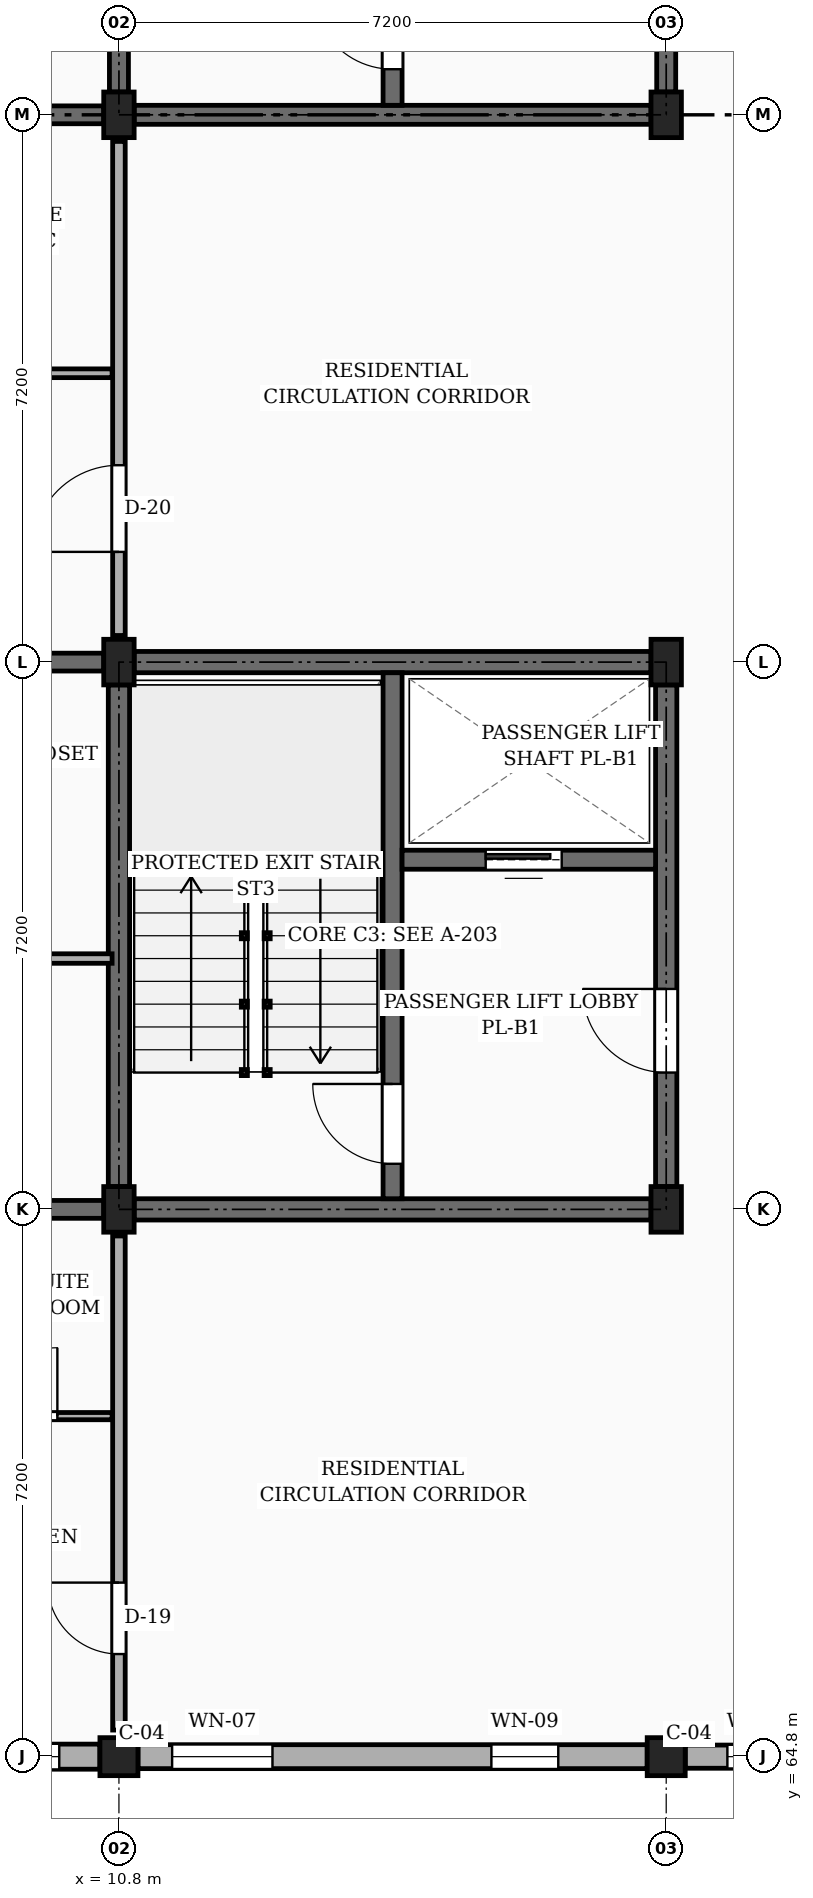
"""IFC4 building model, lengths in metres.
Left out: names, types, materials, properties, quantities, classifications, styles, units other than length and angle.
Written with IfcOpenShell. Run it as: python <this file> out.ifc"""

import sys

from ifc_helpers import new_model, si_unit, direction, frame, frame_2d, origin, origin_2d, place, context, subcontext, project, spatial, rectangle, extrude, element, fill, save


model = new_model("IFC4")
c1 = context("Model", 3, precision=1e-05, world=origin(), true_north=direction((0.0, 1.0)))
c2 = subcontext(c1, "Body", "Model", "MODEL_VIEW")
j1 = project(units=[si_unit("LENGTHUNIT", "METRE"), si_unit("PLANEANGLEUNIT", "RADIAN")], contexts=[c1])
p1 = place(None, origin())
s1 = spatial("IfcSite", under=j1, at=p1, CompositionType="ELEMENT")
p2 = place(p1, origin())
s2 = spatial("IfcBuilding", under=s1, at=p2, CompositionType="ELEMENT")
p3 = place(p2, frame((0.0, 0.0, 23.4)))
s3 = spatial("IfcBuildingStorey", under=s2, at=p3, CompositionType="ELEMENT", Elevation=23.4)
p4 = place(p3, frame((10.8, 64.8, 0.0), z_axis=(0.0, 0.0, 1.0), x_axis=(1.0, 0.0, 0.0)))
e1 = element("IfcColumn", 1, at=p4, inside=s3, PredefinedType="COLUMN", context=c2, shape_type="SweptSolid", body=[
    extrude(rectangle(XDim=0.5, YDim=0.5, at=origin_2d()), origin(), (0.0, 0.0, 1.0), 3.15),
])
for number, where, z_axis, x_axis in (
    (2, (10.8, 72.0, 0.0), (0.0, 0.0, 1.0), (1.0, 0.0, 0.0)),
    (3, (10.8, 79.2, 0.0), (0.0, 0.0, 1.0), (1.0, 0.0, 0.0)),
    (4, (10.8, 86.4, 0.0), (0.0, 0.0, 1.0), (1.0, 0.0, 0.0)),
):
    element("IfcColumn", number, at=place(p3, frame(where, z_axis=z_axis, x_axis=x_axis)), inside=s3, PredefinedType="COLUMN", context=c2, shape_type="SweptSolid", body=[
        extrude(rectangle(XDim=0.4, YDim=0.6, at=origin_2d()), origin(), (0.0, 0.0, 1.0), 3.15),
    ])
p5 = place(p3, frame((18.0, 64.8, 0.0), z_axis=(0.0, 0.0, 1.0), x_axis=(1.0, 0.0, 0.0)))
e5 = element("IfcColumn", 5, at=p5, inside=s3, PredefinedType="COLUMN", context=c2, shape_type="SweptSolid", body=[
    extrude(rectangle(XDim=0.5, YDim=0.5, at=origin_2d()), origin(), (0.0, 0.0, 1.0), 3.15),
])
for number, where, z_axis, x_axis in (
    (6, (18.0, 72.0, 0.0), (0.0, 0.0, 1.0), (1.0, 0.0, 0.0)),
    (7, (18.0, 79.2, 0.0), (0.0, 0.0, 1.0), (1.0, 0.0, 0.0)),
    (8, (18.0, 86.4, 0.0), (0.0, 0.0, 1.0), (1.0, 0.0, 0.0)),
):
    element("IfcColumn", number, at=place(p3, frame(where, z_axis=z_axis, x_axis=x_axis)), inside=s3, PredefinedType="COLUMN", context=c2, shape_type="SweptSolid", body=[
        extrude(rectangle(XDim=0.4, YDim=0.6, at=origin_2d()), origin(), (0.0, 0.0, 1.0), 3.15),
    ])
p6 = place(p3, frame((3.85, 72.0, 0.0), z_axis=(0.0, 0.0, 1.0), x_axis=(1.0, 0.0, 0.0)))
e9 = element("IfcWall", 9, at=p6, inside=s3, PredefinedType="SOLIDWALL", context=c2, shape_type="SweptSolid", body=[
    extrude(rectangle(XDim=6.75, YDim=0.235, at=frame_2d((3.375, 0.0))), origin(), (0.0, 0.0, 1.0), 2.21),
])
p7 = place(p6, frame((1.35, 0.0, 0.0)))
e10 = element("IfcOpeningElement", 10, at=p7, cuts=e9, PredefinedType="OPENING", context=c2, shape_type="SweptSolid", body=[
    extrude(rectangle(XDim=0.98, YDim=2.12, at=frame_2d((0.49, 1.06))), frame((0.0, 0.127, 0.0), z_axis=(0.0, -1.0, 0.0), x_axis=(1.0, 0.0, 0.0)), (0.0, 0.0, 1.0), 0.255),
])
p8 = place(p3, frame((3.85, 79.2, 0.0), z_axis=(0.0, 0.0, 1.0), x_axis=(1.0, 0.0, 0.0)))
e11 = element("IfcWall", 11, at=p8, inside=s3, PredefinedType="SOLIDWALL", context=c2, shape_type="SweptSolid", body=[
    extrude(rectangle(XDim=6.75, YDim=0.235, at=frame_2d((3.375, 0.0))), origin(), (0.0, 0.0, 1.0), 2.21),
])
p9 = place(p3, frame((3.85, 86.4, 0.0), z_axis=(0.0, 0.0, 1.0), x_axis=(1.0, 0.0, 0.0)))
e12 = element("IfcWall", 12, at=p9, inside=s3, PredefinedType="SOLIDWALL", context=c2, shape_type="SweptSolid", body=[
    extrude(rectangle(XDim=6.75, YDim=0.235, at=frame_2d((3.375, 0.0))), origin(), (0.0, 0.0, 1.0), 2.21),
])
p10 = place(p9, frame((1.35, 0.0, 0.0)))
e13 = element("IfcOpeningElement", 13, at=p10, cuts=e12, PredefinedType="OPENING", context=c2, shape_type="SweptSolid", body=[
    extrude(rectangle(XDim=0.98, YDim=2.12, at=frame_2d((0.49, 1.06))), frame((0.0, 0.127, 0.0), z_axis=(0.0, -1.0, 0.0), x_axis=(1.0, 0.0, 0.0)), (0.0, 0.0, 1.0), 0.255),
])
p11 = place(p3, frame((3.85, 64.8, 0.0), z_axis=(0.0, 0.0, 1.0), x_axis=(1.0, 0.0, 0.0)))
e14 = element("IfcWall", 14, at=p11, inside=s3, PredefinedType="SOLIDWALL", context=c2, shape_type="SweptSolid", body=[
    extrude(rectangle(XDim=6.7, YDim=0.33, at=frame_2d((3.35, 0.0))), origin(), (0.0, 0.0, 1.0), 2.48),
])
p12 = place(p11, frame((1.715, 0.0, 0.78)))
e15 = element("IfcOpeningElement", 15, at=p12, cuts=e14, PredefinedType="OPENING", context=c2, shape_type="SweptSolid", body=[
    extrude(rectangle(XDim=1.16, YDim=1.15, at=frame_2d((0.58, 0.575))), frame((0.0, 0.175, 0.0), z_axis=(0.0, -1.0, 0.0), x_axis=(1.0, 0.0, 0.0)), (0.0, 0.0, 1.0), 0.35),
])
p13 = place(p11, frame((4.845, 0.0, 0.78)))
e16 = element("IfcOpeningElement", 16, at=p13, cuts=e14, PredefinedType="OPENING", context=c2, shape_type="SweptSolid", body=[
    extrude(rectangle(XDim=1.32, YDim=1.15, at=frame_2d((0.66, 0.575))), frame((0.0, 0.175, 0.0), z_axis=(0.0, -1.0, 0.0), x_axis=(1.0, 0.0, 0.0)), (0.0, 0.0, 1.0), 0.35),
])
p14 = place(p3, frame((11.05, 64.8, 0.0), z_axis=(0.0, 0.0, 1.0), x_axis=(1.0, 0.0, 0.0)))
e17 = element("IfcWall", 17, at=p14, inside=s3, PredefinedType="SOLIDWALL", context=c2, shape_type="SweptSolid", body=[
    extrude(rectangle(XDim=6.7, YDim=0.315, at=frame_2d((3.35, 0.0))), origin(), (0.0, 0.0, 1.0), 2.48),
])
p15 = place(p14, frame((0.45, 0.0, 0.78)))
e18 = element("IfcOpeningElement", 18, at=p15, cuts=e17, PredefinedType="OPENING", context=c2, shape_type="SweptSolid", body=[
    extrude(rectangle(XDim=1.32, YDim=1.15, at=frame_2d((0.66, 0.575))), frame((0.0, 0.167, 0.0), z_axis=(0.0, -1.0, 0.0), x_axis=(1.0, 0.0, 0.0)), (0.0, 0.0, 1.0), 0.335),
])
p16 = place(p14, frame((4.65, 0.0, 0.78)))
e19 = element("IfcOpeningElement", 19, at=p16, cuts=e17, PredefinedType="OPENING", context=c2, shape_type="SweptSolid", body=[
    extrude(rectangle(XDim=0.88, YDim=1.26, at=frame_2d((0.44, 0.63))), frame((0.0, 0.167, 0.0), z_axis=(0.0, -1.0, 0.0), x_axis=(1.0, 0.0, 0.0)), (0.0, 0.0, 1.0), 0.335),
])
p17 = place(p3, frame((18.25, 64.8, 0.0), z_axis=(0.0, 0.0, 1.0), x_axis=(1.0, 0.0, 0.0)))
e20 = element("IfcWall", 20, at=p17, inside=s3, PredefinedType="SOLIDWALL", context=c2, shape_type="SweptSolid", body=[
    extrude(rectangle(XDim=6.7, YDim=0.305, at=frame_2d((3.35, 0.0))), origin(), (0.0, 0.0, 1.0), 2.48),
])
p18 = place(p17, frame((0.555, 0.0, 0.78)))
e21 = element("IfcOpeningElement", 21, at=p18, cuts=e20, PredefinedType="OPENING", context=c2, shape_type="SweptSolid", body=[
    extrude(rectangle(XDim=0.88, YDim=1.26, at=frame_2d((0.44, 0.63))), frame((0.0, 0.163, 0.0), z_axis=(0.0, -1.0, 0.0), x_axis=(1.0, 0.0, 0.0)), (0.0, 0.0, 1.0), 0.325),
])
p19 = place(p17, frame((2.28, 0.0, 0.78)))
e22 = element("IfcOpeningElement", 22, at=p19, cuts=e20, PredefinedType="OPENING", context=c2, shape_type="SweptSolid", body=[
    extrude(rectangle(XDim=1.04, YDim=1.26, at=frame_2d((0.52, 0.63))), frame((0.0, 0.163, 0.0), z_axis=(0.0, -1.0, 0.0), x_axis=(1.0, 0.0, 0.0)), (0.0, 0.0, 1.0), 0.325),
])
p20 = place(p17, frame((4.555, 0.0, 0.78)))
e23 = element("IfcOpeningElement", 23, at=p20, cuts=e20, PredefinedType="OPENING", context=c2, shape_type="SweptSolid", body=[
    extrude(rectangle(XDim=1.2, YDim=1.26, at=frame_2d((0.6, 0.63))), frame((0.0, 0.163, 0.0), z_axis=(0.0, -1.0, 0.0), x_axis=(1.0, 0.0, 0.0)), (0.0, 0.0, 1.0), 0.325),
])
p21 = place(p3, frame((10.8, 72.3, 0.0), z_axis=(0.0, 0.0, 1.0), x_axis=(0.0, 1.0, 0.0)))
e24 = element("IfcWall", 24, at=p21, inside=s3, PredefinedType="SHEAR", context=c2, shape_type="SweptSolid", body=[
    extrude(rectangle(XDim=6.6, YDim=0.28, at=frame_2d((3.3, 0.0))), origin(), (0.0, 0.0, 1.0), 2.91),
])
p22 = place(p3, frame((11.0, 79.2, 0.0), z_axis=(0.0, 0.0, 1.0), x_axis=(1.0, 0.0, 0.0)))
e25 = element("IfcWall", 25, at=p22, inside=s3, PredefinedType="SHEAR", context=c2, shape_type="SweptSolid", body=[
    extrude(rectangle(XDim=6.8, YDim=0.28, at=frame_2d((3.4, 0.0))), origin(), (0.0, 0.0, 1.0), 2.91),
])
p23 = place(p3, frame((18.0, 72.3, 0.0), z_axis=(0.0, 0.0, 1.0), x_axis=(0.0, 1.0, 0.0)))
e26 = element("IfcWall", 26, at=p23, inside=s3, PredefinedType="SHEAR", context=c2, shape_type="SweptSolid", body=[
    extrude(rectangle(XDim=6.6, YDim=0.28, at=frame_2d((3.3, 0.0))), origin(), (0.0, 0.0, 1.0), 2.91),
])
p24 = place(p23, frame((1.5, 0.0, 0.0)))
e27 = element("IfcOpeningElement", 27, at=p24, cuts=e26, PredefinedType="OPENING", context=c2, shape_type="SweptSolid", body=[
    extrude(rectangle(XDim=1.1, YDim=2.15, at=frame_2d((0.55, 1.075))), frame((0.0, 0.15, 0.0), z_axis=(0.0, -1.0, 0.0), x_axis=(1.0, 0.0, 0.0)), (0.0, 0.0, 1.0), 0.3),
])
p25 = place(p3, frame((11.0, 72.0, 0.0), z_axis=(0.0, 0.0, 1.0), x_axis=(1.0, 0.0, 0.0)))
e28 = element("IfcWall", 28, at=p25, inside=s3, PredefinedType="SHEAR", context=c2, shape_type="SweptSolid", body=[
    extrude(rectangle(XDim=6.8, YDim=0.28, at=frame_2d((3.4, 0.0))), origin(), (0.0, 0.0, 1.0), 2.91),
])
p26 = place(p3, frame((14.4, 72.14, 0.0), z_axis=(0.0, 0.0, 1.0), x_axis=(0.0, 1.0, 0.0)))
e29 = element("IfcWall", 29, at=p26, inside=s3, PredefinedType="SHEAR", context=c2, shape_type="SweptSolid", body=[
    extrude(rectangle(XDim=6.92, YDim=0.25, at=frame_2d((3.46, 0.0))), origin(), (0.0, 0.0, 1.0), 2.91),
])
p27 = place(p26, frame((0.46, 0.0, 0.0)))
e30 = element("IfcOpeningElement", 30, at=p27, cuts=e29, PredefinedType="OPENING", context=c2, shape_type="SweptSolid", body=[
    extrude(rectangle(XDim=1.05, YDim=2.15, at=frame_2d((0.525, 1.075))), frame((0.0, 0.135, 0.0), z_axis=(0.0, -1.0, 0.0), x_axis=(1.0, 0.0, 0.0)), (0.0, 0.0, 1.0), 0.27),
])
p28 = place(p3, frame((14.525, 76.6, 0.0), z_axis=(0.0, 0.0, 1.0), x_axis=(1.0, 0.0, 0.0)))
e31 = element("IfcWall", 31, at=p28, inside=s3, PredefinedType="SHEAR", context=c2, shape_type="SweptSolid", body=[
    extrude(rectangle(XDim=3.335, YDim=0.25, at=frame_2d((1.667, 0.0))), origin(), (0.0, 0.0, 1.0), 2.91),
])
p29 = place(p28, frame((1.1, 0.0, 0.0)))
e32 = element("IfcOpeningElement", 32, at=p29, cuts=e31, PredefinedType="OPENING", context=c2, shape_type="SweptSolid", body=[
    extrude(rectangle(XDim=1.0, YDim=2.2, at=frame_2d((0.5, 1.1))), frame((0.0, 0.135, 0.0), z_axis=(0.0, -1.0, 0.0), x_axis=(1.0, 0.0, 0.0)), (0.0, 0.0, 1.0), 0.27),
])
p30 = place(p3, frame((10.8, 86.7, 0.0), z_axis=(0.0, 0.0, 1.0), x_axis=(0.0, 1.0, 0.0)))
e33 = element("IfcWall", 33, at=p30, inside=s3, PredefinedType="SHEAR", context=c2, shape_type="SweptSolid", body=[
    extrude(rectangle(XDim=6.65, YDim=0.25, at=frame_2d((3.325, 0.0))), origin(), (0.0, 0.0, 1.0), 2.91),
])
p31 = place(p3, frame((18.0, 86.7, 0.0), z_axis=(0.0, 0.0, 1.0), x_axis=(0.0, 1.0, 0.0)))
e34 = element("IfcWall", 34, at=p31, inside=s3, PredefinedType="SHEAR", context=c2, shape_type="SweptSolid", body=[
    extrude(rectangle(XDim=6.65, YDim=0.25, at=frame_2d((3.325, 0.0))), origin(), (0.0, 0.0, 1.0), 2.91),
])
p32 = place(p31, frame((1.5, 0.0, 0.0)))
e35 = element("IfcOpeningElement", 35, at=p32, cuts=e34, PredefinedType="OPENING", context=c2, shape_type="SweptSolid", body=[
    extrude(rectangle(XDim=1.1, YDim=2.15, at=frame_2d((0.55, 1.075))), frame((0.0, 0.135, 0.0), z_axis=(0.0, -1.0, 0.0), x_axis=(1.0, 0.0, 0.0)), (0.0, 0.0, 1.0), 0.27),
])
p33 = place(p3, frame((11.0, 86.4, 0.0), z_axis=(0.0, 0.0, 1.0), x_axis=(1.0, 0.0, 0.0)))
e36 = element("IfcWall", 36, at=p33, inside=s3, PredefinedType="SHEAR", context=c2, shape_type="SweptSolid", body=[
    extrude(rectangle(XDim=6.8, YDim=0.25, at=frame_2d((3.4, 0.0))), origin(), (0.0, 0.0, 1.0), 2.91),
])
p34 = place(p3, frame((14.4, 86.525, 0.0), z_axis=(0.0, 0.0, 1.0), x_axis=(0.0, 1.0, 0.0)))
e37 = element("IfcWall", 37, at=p34, inside=s3, PredefinedType="SHEAR", context=c2, shape_type="SweptSolid", body=[
    extrude(rectangle(XDim=6.915, YDim=0.25, at=frame_2d((3.458, 0.0))), origin(), (0.0, 0.0, 1.0), 2.91),
])
p35 = place(p34, frame((0.475, 0.0, 0.0)))
e38 = element("IfcOpeningElement", 38, at=p35, cuts=e37, PredefinedType="OPENING", context=c2, shape_type="SweptSolid", body=[
    extrude(rectangle(XDim=1.05, YDim=2.15, at=frame_2d((0.525, 1.075))), frame((0.0, 0.135, 0.0), z_axis=(0.0, -1.0, 0.0), x_axis=(1.0, 0.0, 0.0)), (0.0, 0.0, 1.0), 0.27),
])
p36 = place(p3, frame((10.8, 65.15, 0.0), z_axis=(0.0, 0.0, 1.0), x_axis=(0.0, 1.0, 0.0)))
e39 = element("IfcWall", 39, at=p36, inside=s3, PredefinedType="PARTITIONING", context=c2, shape_type="SweptSolid", body=[
    extrude(rectangle(XDim=6.5, YDim=0.165, at=frame_2d((3.25, 0.0))), origin(), (0.0, 0.0, 1.0), 2.345),
])
p37 = place(p36, frame((1.0, 0.0, 0.0)))
e40 = element("IfcOpeningElement", 40, at=p37, cuts=e39, PredefinedType="OPENING", context=c2, shape_type="SweptSolid", body=[
    extrude(rectangle(XDim=0.94, YDim=2.12, at=frame_2d((0.47, 1.06))), frame((0.0, 0.093, 0.0), z_axis=(0.0, -1.0, 0.0), x_axis=(1.0, 0.0, 0.0)), (0.0, 0.0, 1.0), 0.185),
])
p38 = place(p3, frame((10.8, 79.55, 0.0), z_axis=(0.0, 0.0, 1.0), x_axis=(0.0, 1.0, 0.0)))
e41 = element("IfcWall", 41, at=p38, inside=s3, PredefinedType="PARTITIONING", context=c2, shape_type="SweptSolid", body=[
    extrude(rectangle(XDim=6.5, YDim=0.165, at=frame_2d((3.25, 0.0))), origin(), (0.0, 0.0, 1.0), 2.345),
])
p39 = place(p38, frame((1.1, 0.0, 0.0)))
e42 = element("IfcOpeningElement", 42, at=p39, cuts=e41, PredefinedType="OPENING", context=c2, shape_type="SweptSolid", body=[
    extrude(rectangle(XDim=1.14, YDim=2.18, at=frame_2d((0.57, 1.09))), frame((0.0, 0.093, 0.0), z_axis=(0.0, -1.0, 0.0), x_axis=(1.0, 0.0, 0.0)), (0.0, 0.0, 1.0), 0.185),
])
p40 = place(p3, frame((8.37, 69.28, 0.0), z_axis=(0.0, 0.0, 1.0), x_axis=(1.0, 0.0, 0.0)))
e43 = element("IfcWall", 43, at=p40, inside=s3, PredefinedType="PARTITIONING", context=c2, shape_type="SweptSolid", body=[
    extrude(rectangle(XDim=2.34, YDim=0.095, at=frame_2d((1.17, 0.0))), origin(), (0.0, 0.0, 1.0), 2.345),
])
p41 = place(p40, frame((0.72, 0.0, 0.0)))
e44 = element("IfcOpeningElement", 44, at=p41, cuts=e43, PredefinedType="OPENING", context=c2, shape_type="SweptSolid", body=[
    extrude(rectangle(XDim=0.9, YDim=2.05, at=frame_2d((0.45, 1.025))), frame((0.0, 0.058, 0.0), z_axis=(0.0, -1.0, 0.0), x_axis=(1.0, 0.0, 0.0)), (0.0, 0.0, 1.0), 0.115),
])
p42 = place(p3, frame((3.775, 75.3, 0.0), z_axis=(0.0, 0.0, 1.0), x_axis=(1.0, 0.0, 0.0)))
e45 = element("IfcWall", 45, at=p42, inside=s3, PredefinedType="PARTITIONING", context=c2, shape_type="SweptSolid", body=[
    extrude(rectangle(XDim=6.935, YDim=0.125, at=frame_2d((3.468, 0.0))), origin(), (0.0, 0.0, 1.0), 2.345),
])
p43 = place(p42, frame((1.1, 0.0, 0.0)))
e46 = element("IfcOpeningElement", 46, at=p43, cuts=e45, PredefinedType="OPENING", context=c2, shape_type="SweptSolid", body=[
    extrude(rectangle(XDim=0.87, YDim=2.05, at=frame_2d((0.435, 1.025))), frame((0.0, 0.073, 0.0), z_axis=(0.0, -1.0, 0.0), x_axis=(1.0, 0.0, 0.0)), (0.0, 0.0, 1.0), 0.145),
])
p44 = place(p42, frame((4.5, 0.0, 0.0)))
e47 = element("IfcOpeningElement", 47, at=p44, cuts=e45, PredefinedType="OPENING", context=c2, shape_type="SweptSolid", body=[
    extrude(rectangle(XDim=0.88, YDim=2.08, at=frame_2d((0.44, 1.04))), frame((0.0, 0.073, 0.0), z_axis=(0.0, -1.0, 0.0), x_axis=(1.0, 0.0, 0.0)), (0.0, 0.0, 1.0), 0.145),
])
p45 = place(p3, frame((3.775, 83.0, 0.0), z_axis=(0.0, 0.0, 1.0), x_axis=(1.0, 0.0, 0.0)))
e48 = element("IfcWall", 48, at=p45, inside=s3, PredefinedType="PARTITIONING", context=c2, shape_type="SweptSolid", body=[
    extrude(rectangle(XDim=6.935, YDim=0.115, at=frame_2d((3.468, 0.0))), origin(), (0.0, 0.0, 1.0), 2.345),
])
p46 = place(p45, frame((4.6, 0.0, 0.0)))
e49 = element("IfcOpeningElement", 49, at=p46, cuts=e48, PredefinedType="OPENING", context=c2, shape_type="SweptSolid", body=[
    extrude(rectangle(XDim=0.87, YDim=2.05, at=frame_2d((0.435, 1.025))), frame((0.0, 0.067, 0.0), z_axis=(0.0, -1.0, 0.0), x_axis=(1.0, 0.0, 0.0)), (0.0, 0.0, 1.0), 0.135),
])
p47 = place(p45, frame((1.2, 0.0, 0.0)))
e50 = element("IfcOpeningElement", 50, at=p47, cuts=e48, PredefinedType="OPENING", context=c2, shape_type="SweptSolid", body=[
    extrude(rectangle(XDim=0.92, YDim=2.1, at=frame_2d((0.46, 1.05))), frame((0.0, 0.067, 0.0), z_axis=(0.0, -1.0, 0.0), x_axis=(1.0, 0.0, 0.0)), (0.0, 0.0, 1.0), 0.135),
])
p48 = place(p13, origin())
e51 = element("IfcWindow", 51, at=p48, inside=s3, PartitioningType="SINGLE_PANEL", PredefinedType="WINDOW", context=c2, shape_type="SweptSolid", body=[
    extrude(rectangle(XDim=1.32, YDim=1.15, at=frame_2d((0.66, 0.575))), frame((0.0, 0.03, 0.0), z_axis=(0.0, -1.0, 0.0), x_axis=(1.0, 0.0, 0.0)), (0.0, 0.0, 1.0), 0.06),
])
fill(e16, e51)
p49 = place(p15, origin())
e52 = element("IfcWindow", 52, at=p49, inside=s3, PartitioningType="SINGLE_PANEL", PredefinedType="WINDOW", context=c2, shape_type="SweptSolid", body=[
    extrude(rectangle(XDim=1.32, YDim=1.15, at=frame_2d((0.66, 0.575))), frame((0.0, 0.03, 0.0), z_axis=(0.0, -1.0, 0.0), x_axis=(1.0, 0.0, 0.0)), (0.0, 0.0, 1.0), 0.06),
])
fill(e18, e52)
p50 = place(p16, origin())
e53 = element("IfcWindow", 53, at=p50, inside=s3, PartitioningType="SINGLE_PANEL", PredefinedType="WINDOW", context=c2, shape_type="SweptSolid", body=[
    extrude(rectangle(XDim=0.88, YDim=1.26, at=frame_2d((0.44, 0.63))), frame((0.0, 0.03, 0.0), z_axis=(0.0, -1.0, 0.0), x_axis=(1.0, 0.0, 0.0)), (0.0, 0.0, 1.0), 0.06),
])
fill(e19, e53)
p51 = place(p18, origin())
e54 = element("IfcWindow", 54, at=p51, inside=s3, PartitioningType="SINGLE_PANEL", PredefinedType="WINDOW", context=c2, shape_type="SweptSolid", body=[
    extrude(rectangle(XDim=0.88, YDim=1.26, at=frame_2d((0.44, 0.63))), frame((0.0, 0.03, 0.0), z_axis=(0.0, -1.0, 0.0), x_axis=(1.0, 0.0, 0.0)), (0.0, 0.0, 1.0), 0.06),
])
fill(e21, e54)
p52 = place(p24, frame((1.1, 0.0, 0.0), z_axis=(0.0, 0.0, 1.0), x_axis=(-1.0, 0.0, 0.0)))
e55 = element("IfcDoor", 55, at=p52, inside=s3, OperationType="SINGLE_SWING_RIGHT", PredefinedType="DOOR", context=c2, shape_type="SweptSolid", body=[
    extrude(rectangle(XDim=1.1, YDim=2.15, at=frame_2d((0.55, 1.075))), frame((0.0, 0.025, 0.0), z_axis=(0.0, -1.0, 0.0), x_axis=(1.0, 0.0, 0.0)), (0.0, 0.0, 1.0), 0.05),
])
fill(e27, e55)
p53 = place(p27, origin())
e56 = element("IfcDoor", 56, at=p53, inside=s3, OperationType="SINGLE_SWING_RIGHT", PredefinedType="DOOR", context=c2, shape_type="SweptSolid", body=[
    extrude(rectangle(XDim=1.05, YDim=2.15, at=frame_2d((0.525, 1.075))), frame((0.0, 0.025, 0.0), z_axis=(0.0, -1.0, 0.0), x_axis=(1.0, 0.0, 0.0)), (0.0, 0.0, 1.0), 0.05),
])
fill(e30, e56)
p54 = place(p29, origin())
e57 = element("IfcDoor", 57, at=p54, inside=s3, OperationType="SLIDING_TO_LEFT", PredefinedType="DOOR", context=c2, shape_type="SweptSolid", body=[
    extrude(rectangle(XDim=1.0, YDim=2.2, at=frame_2d((0.5, 1.1))), frame((0.0, 0.025, 0.0), z_axis=(0.0, -1.0, 0.0), x_axis=(1.0, 0.0, 0.0)), (0.0, 0.0, 1.0), 0.05),
])
fill(e32, e57)
p55 = place(p35, origin())
e58 = element("IfcDoor", 58, at=p55, inside=s3, OperationType="SINGLE_SWING_RIGHT", PredefinedType="DOOR", context=c2, shape_type="SweptSolid", body=[
    extrude(rectangle(XDim=1.05, YDim=2.15, at=frame_2d((0.525, 1.075))), frame((0.0, 0.025, 0.0), z_axis=(0.0, -1.0, 0.0), x_axis=(1.0, 0.0, 0.0)), (0.0, 0.0, 1.0), 0.05),
])
fill(e38, e58)
p56 = place(p37, origin())
e59 = element("IfcDoor", 59, at=p56, inside=s3, OperationType="SINGLE_SWING_RIGHT", PredefinedType="DOOR", context=c2, shape_type="SweptSolid", body=[
    extrude(rectangle(XDim=0.94, YDim=2.12, at=frame_2d((0.47, 1.06))), frame((0.0, 0.025, 0.0), z_axis=(0.0, -1.0, 0.0), x_axis=(1.0, 0.0, 0.0)), (0.0, 0.0, 1.0), 0.05),
])
fill(e40, e59)
p57 = place(p39, origin())
e60 = element("IfcDoor", 60, at=p57, inside=s3, OperationType="SINGLE_SWING_LEFT", PredefinedType="DOOR", context=c2, shape_type="SweptSolid", body=[
    extrude(rectangle(XDim=1.14, YDim=2.18, at=frame_2d((0.57, 1.09))), frame((0.0, 0.025, 0.0), z_axis=(0.0, -1.0, 0.0), x_axis=(1.0, 0.0, 0.0)), (0.0, 0.0, 1.0), 0.05),
])
fill(e42, e60)
p58 = place(p41, origin())
e61 = element("IfcDoor", 61, at=p58, inside=s3, OperationType="SINGLE_SWING_RIGHT", PredefinedType="DOOR", context=c2, shape_type="SweptSolid", body=[
    extrude(rectangle(XDim=0.9, YDim=2.05, at=frame_2d((0.45, 1.025))), frame((0.0, 0.025, 0.0), z_axis=(0.0, -1.0, 0.0), x_axis=(1.0, 0.0, 0.0)), (0.0, 0.0, 1.0), 0.05),
])
fill(e44, e61)
save(model, sys.argv[1])
